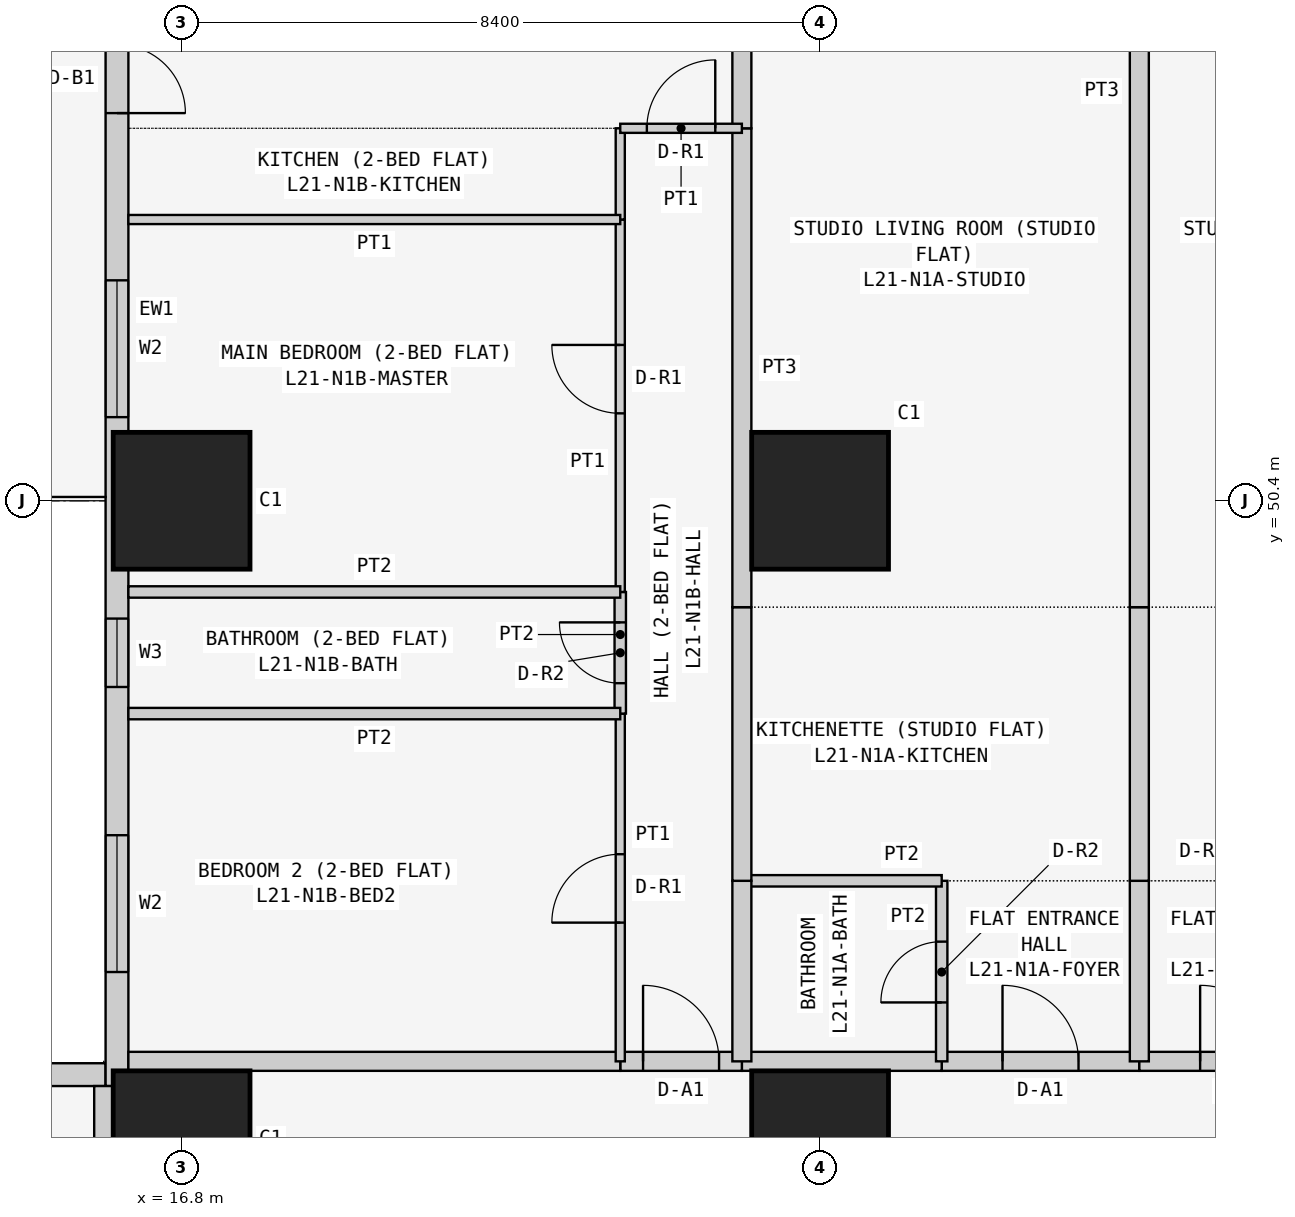
"""IFC4 building model, lengths in metres.
Left out: names, types, materials, properties, quantities, classifications, styles, units other than length and angle.
Written with IfcOpenShell. Run it as: python <this file> out.ifc"""

import sys

from ifc_helpers import new_model, si_unit, direction, frame, frame_2d, origin, origin_2d, place, context, subcontext, project, spatial, rectangle, extrude, element, fill, save


model = new_model("IFC4")
c1 = context("Model", 3, precision=1e-05, world=origin(), true_north=direction((0.0, 1.0)))
c2 = subcontext(c1, "Body", "Model", "MODEL_VIEW")
j1 = project(units=[si_unit("LENGTHUNIT", "METRE"), si_unit("PLANEANGLEUNIT", "RADIAN")], contexts=[c1])
p1 = place(None, origin())
s1 = spatial("IfcSite", under=j1, at=p1, CompositionType="ELEMENT")
p2 = place(p1, origin())
s2 = spatial("IfcBuilding", under=s1, at=p2, CompositionType="ELEMENT")
p3 = place(p2, frame((0.0, 0.0, 84.9)))
s3 = spatial("IfcBuildingStorey", under=s2, at=p3, CompositionType="ELEMENT", Elevation=84.9)
for number, where, z_axis, x_axis in (
    (1, (16.8, 42.0, 0.0), (0.0, 0.0, 1.0), (1.0, 0.0, 0.0)),
    (2, (16.8, 50.4, 0.0), (0.0, 0.0, 1.0), (1.0, 0.0, 0.0)),
    (3, (25.2, 42.0, 0.0), (0.0, 0.0, 1.0), (1.0, 0.0, 0.0)),
    (4, (25.2, 50.4, 0.0), (0.0, 0.0, 1.0), (1.0, 0.0, 0.0)),
):
    element("IfcColumn", number, at=place(p3, frame(where, z_axis=z_axis, x_axis=x_axis)), inside=s3, PredefinedType="COLUMN", context=c2, shape_type="SweptSolid", body=[
        extrude(rectangle(XDim=1.8, YDim=1.8, at=origin_2d()), origin(), (0.0, 0.0, 1.0), 3.6),
    ])
p4 = place(p3, frame((15.8, 42.85, 0.0), z_axis=(0.0, 0.0, 1.0), x_axis=(-1.0, 0.0, 0.0)))
e5 = element("IfcWall", 5, at=p4, inside=s3, PredefinedType="SOLIDWALL", context=c2, shape_type="SweptSolid", body=[
    extrude(rectangle(XDim=15.4, YDim=0.3, at=frame_2d((7.7, 0.0))), origin(), (0.0, 0.0, 1.0), 3.45),
])
p5 = place(p4, frame((1.2, 0.0, 0.9)))
e6 = element("IfcOpeningElement", 6, at=p5, cuts=e5, PredefinedType="OPENING", context=c2, shape_type="SweptSolid", body=[
    extrude(rectangle(XDim=1.8, YDim=1.5, at=frame_2d((0.9, 0.75))), frame((0.0, 0.16, 0.0), z_axis=(0.0, -1.0, 0.0), x_axis=(1.0, 0.0, 0.0)), (0.0, 0.0, 1.0), 0.32),
])
p6 = place(p4, frame((4.95, 0.0, 1.5)))
e7 = element("IfcOpeningElement", 7, at=p6, cuts=e5, PredefinedType="OPENING", context=c2, shape_type="SweptSolid", body=[
    extrude(rectangle(XDim=0.9, YDim=0.7, at=frame_2d((0.45, 0.35))), frame((0.0, 0.16, 0.0), z_axis=(0.0, -1.0, 0.0), x_axis=(1.0, 0.0, 0.0)), (0.0, 0.0, 1.0), 0.32),
])
p7 = place(p4, frame((8.5, 0.0, 0.9)))
e8 = element("IfcOpeningElement", 8, at=p7, cuts=e5, PredefinedType="OPENING", context=c2, shape_type="SweptSolid", body=[
    extrude(rectangle(XDim=1.8, YDim=1.5, at=frame_2d((0.9, 0.75))), frame((0.0, 0.16, 0.0), z_axis=(0.0, -1.0, 0.0), x_axis=(1.0, 0.0, 0.0)), (0.0, 0.0, 1.0), 0.32),
])
p8 = place(p4, frame((12.5, 0.0, 0.0)))
e9 = element("IfcOpeningElement", 9, at=p8, cuts=e5, PredefinedType="OPENING", context=c2, shape_type="SweptSolid", body=[
    extrude(rectangle(XDim=0.9, YDim=2.4, at=frame_2d((0.45, 1.2))), frame((0.0, 0.16, 0.0), z_axis=(0.0, -1.0, 0.0), x_axis=(1.0, 0.0, 0.0)), (0.0, 0.0, 1.0), 0.32),
])
p9 = place(p4, frame((13.5, 0.0, 0.9)))
e10 = element("IfcOpeningElement", 10, at=p9, cuts=e5, PredefinedType="OPENING", context=c2, shape_type="SweptSolid", body=[
    extrude(rectangle(XDim=1.2, YDim=1.5, at=frame_2d((0.6, 0.75))), frame((0.0, 0.16, 0.0), z_axis=(0.0, -1.0, 0.0), x_axis=(1.0, 0.0, 0.0)), (0.0, 0.0, 1.0), 0.32),
])
p10 = place(p3, frame((15.95, 58.4, 0.0), z_axis=(0.0, 0.0, 1.0), x_axis=(0.0, -1.0, 0.0)))
e11 = element("IfcWall", 11, at=p10, inside=s3, PredefinedType="SOLIDWALL", context=c2, shape_type="SweptSolid", body=[
    extrude(rectangle(XDim=15.7, YDim=0.3, at=frame_2d((7.85, 0.0))), origin(), (0.0, 0.0, 1.0), 3.45),
])
p11 = place(p10, frame((12.4, 0.0, 0.9)))
e12 = element("IfcOpeningElement", 12, at=p11, cuts=e11, PredefinedType="OPENING", context=c2, shape_type="SweptSolid", body=[
    extrude(rectangle(XDim=1.8, YDim=1.5, at=frame_2d((0.9, 0.75))), frame((0.0, 0.16, 0.0), z_axis=(0.0, -1.0, 0.0), x_axis=(1.0, 0.0, 0.0)), (0.0, 0.0, 1.0), 0.32),
])
p12 = place(p10, frame((9.55, 0.0, 1.5)))
e13 = element("IfcOpeningElement", 13, at=p12, cuts=e11, PredefinedType="OPENING", context=c2, shape_type="SweptSolid", body=[
    extrude(rectangle(XDim=0.9, YDim=0.7, at=frame_2d((0.45, 0.35))), frame((0.0, 0.16, 0.0), z_axis=(0.0, -1.0, 0.0), x_axis=(1.0, 0.0, 0.0)), (0.0, 0.0, 1.0), 0.32),
])
p13 = place(p10, frame((5.1, 0.0, 0.9)))
e14 = element("IfcOpeningElement", 14, at=p13, cuts=e11, PredefinedType="OPENING", context=c2, shape_type="SweptSolid", body=[
    extrude(rectangle(XDim=1.8, YDim=1.5, at=frame_2d((0.9, 0.75))), frame((0.0, 0.16, 0.0), z_axis=(0.0, -1.0, 0.0), x_axis=(1.0, 0.0, 0.0)), (0.0, 0.0, 1.0), 0.32),
])
p14 = place(p10, frame((2.0, 0.0, 0.0)))
e15 = element("IfcOpeningElement", 15, at=p14, cuts=e11, PredefinedType="OPENING", context=c2, shape_type="SweptSolid", body=[
    extrude(rectangle(XDim=0.9, YDim=2.4, at=frame_2d((0.45, 1.2))), frame((0.0, 0.16, 0.0), z_axis=(0.0, -1.0, 0.0), x_axis=(1.0, 0.0, 0.0)), (0.0, 0.0, 1.0), 0.32),
])
p15 = place(p10, frame((0.7, 0.0, 0.9)))
e16 = element("IfcOpeningElement", 16, at=p15, cuts=e11, PredefinedType="OPENING", context=c2, shape_type="SweptSolid", body=[
    extrude(rectangle(XDim=1.2, YDim=1.5, at=frame_2d((0.6, 0.75))), frame((0.0, 0.16, 0.0), z_axis=(0.0, -1.0, 0.0), x_axis=(1.0, 0.0, 0.0)), (0.0, 0.0, 1.0), 0.32),
])
p16 = place(p3, frame((26.8, 43.025, 0.0), z_axis=(0.0, 0.0, 1.0), x_axis=(1.0, 0.0, 0.0)))
e17 = element("IfcWall", 17, at=p16, inside=s3, PredefinedType="PARTITIONING", context=c2, shape_type="SweptSolid", body=[
    extrude(rectangle(XDim=2.6, YDim=0.25, at=frame_2d((1.3, 0.0))), origin(), (0.0, 0.0, 1.0), 3.45),
])
p17 = place(p16, frame((0.8, 0.0, 0.0)))
e18 = element("IfcOpeningElement", 18, at=p17, cuts=e17, PredefinedType="OPENING", context=c2, shape_type="SweptSolid", body=[
    extrude(rectangle(XDim=1.0, YDim=2.1, at=frame_2d((0.5, 1.05))), frame((0.0, 0.135, 0.0), z_axis=(0.0, -1.0, 0.0), x_axis=(1.0, 0.0, 0.0)), (0.0, 0.0, 1.0), 0.27),
])
p18 = place(p3, frame((24.171, 43.025, 0.0), z_axis=(0.0, 0.0, 1.0), x_axis=(1.0, 0.0, 0.0)))
e19 = element("IfcWall", 19, at=p18, inside=s3, PredefinedType="PARTITIONING", context=c2, shape_type="SweptSolid", body=[
    extrude(rectangle(XDim=2.629, YDim=0.25, at=frame_2d((1.314, 0.0))), origin(), (0.0, 0.0, 1.0), 3.45),
])
p19 = place(p3, frame((22.571, 43.025, 0.0), z_axis=(0.0, 0.0, 1.0), x_axis=(1.0, 0.0, 0.0)))
e20 = element("IfcWall", 20, at=p19, inside=s3, PredefinedType="PARTITIONING", context=c2, shape_type="SweptSolid", body=[
    extrude(rectangle(XDim=1.6, YDim=0.25, at=frame_2d((0.8, 0.0))), origin(), (0.0, 0.0, 1.0), 3.45),
])
p20 = place(p19, frame((0.3, 0.0, 0.0)))
e21 = element("IfcOpeningElement", 21, at=p20, cuts=e20, PredefinedType="OPENING", context=c2, shape_type="SweptSolid", body=[
    extrude(rectangle(XDim=1.0, YDim=2.1, at=frame_2d((0.5, 1.05))), frame((0.0, 0.135, 0.0), z_axis=(0.0, -1.0, 0.0), x_axis=(1.0, 0.0, 0.0)), (0.0, 0.0, 1.0), 0.27),
])
p21 = place(p3, frame((16.1, 43.025, 0.0), z_axis=(0.0, 0.0, 1.0), x_axis=(1.0, 0.0, 0.0)))
e22 = element("IfcWall", 22, at=p21, inside=s3, PredefinedType="PARTITIONING", context=c2, shape_type="SweptSolid", body=[
    extrude(rectangle(XDim=6.471, YDim=0.25, at=frame_2d((3.235, 0.0))), origin(), (0.0, 0.0, 1.0), 3.45),
])
p22 = place(p3, frame((29.4, 43.025, 0.0), z_axis=(0.0, 0.0, 1.0), x_axis=(1.0, 0.0, 0.0)))
e23 = element("IfcWall", 23, at=p22, inside=s3, PredefinedType="PARTITIONING", context=c2, shape_type="SweptSolid", body=[
    extrude(rectangle(XDim=2.6, YDim=0.25, at=frame_2d((1.3, 0.0))), origin(), (0.0, 0.0, 1.0), 3.45),
])
p23 = place(p22, frame((0.8, 0.0, 0.0)))
e24 = element("IfcOpeningElement", 24, at=p23, cuts=e23, PredefinedType="OPENING", context=c2, shape_type="SweptSolid", body=[
    extrude(rectangle(XDim=1.0, YDim=2.1, at=frame_2d((0.5, 1.05))), frame((0.0, 0.135, 0.0), z_axis=(0.0, -1.0, 0.0), x_axis=(1.0, 0.0, 0.0)), (0.0, 0.0, 1.0), 0.27),
])
p24 = place(p3, frame((15.775, 36.229, 0.0), z_axis=(0.0, 0.0, 1.0), x_axis=(0.0, 1.0, 0.0)))
e25 = element("IfcWall", 25, at=p24, inside=s3, PredefinedType="PARTITIONING", context=c2, shape_type="SweptSolid", body=[
    extrude(rectangle(XDim=6.471, YDim=0.25, at=frame_2d((3.235, 0.0))), origin(), (0.0, 0.0, 1.0), 3.45),
])
p25 = place(p3, frame((26.8, 45.4, 0.0), z_axis=(0.0, 0.0, 1.0), x_axis=(0.0, -1.0, 0.0)))
e26 = element("IfcWall", 26, at=p25, inside=s3, PredefinedType="PARTITIONING", context=c2, shape_type="SweptSolid", body=[
    extrude(rectangle(XDim=2.375, YDim=0.15, at=frame_2d((1.188, 0.0))), origin(), (0.0, 0.0, 1.0), 3.45),
])
p26 = place(p25, frame((0.8, 0.0, 0.0)))
e27 = element("IfcOpeningElement", 27, at=p26, cuts=e26, PredefinedType="OPENING", context=c2, shape_type="SweptSolid", body=[
    extrude(rectangle(XDim=0.8, YDim=2.1, at=frame_2d((0.4, 1.05))), frame((0.0, 0.085, 0.0), z_axis=(0.0, -1.0, 0.0), x_axis=(1.0, 0.0, 0.0)), (0.0, 0.0, 1.0), 0.17),
])
p27 = place(p3, frame((29.4, 43.025, 0.0), z_axis=(0.0, 0.0, 1.0), x_axis=(0.0, 1.0, 0.0)))
e28 = element("IfcWall", 28, at=p27, inside=s3, PredefinedType="PARTITIONING", context=c2, shape_type="SweptSolid", body=[
    extrude(rectangle(XDim=2.375, YDim=0.25, at=frame_2d((1.188, 0.0))), origin(), (0.0, 0.0, 1.0), 2.848),
])
p28 = place(p3, frame((26.8, 45.4, 0.0), z_axis=(0.0, 0.0, 1.0), x_axis=(-1.0, 0.0, 0.0)))
e29 = element("IfcWall", 29, at=p28, inside=s3, PredefinedType="PARTITIONING", context=c2, shape_type="SweptSolid", body=[
    extrude(rectangle(XDim=2.629, YDim=0.15, at=frame_2d((1.314, 0.0))), origin(), (0.0, 0.0, 1.0), 3.45),
])
p29 = place(p3, frame((24.171, 45.4, 0.0), z_axis=(0.0, 0.0, 1.0), x_axis=(0.0, -1.0, 0.0)))
e30 = element("IfcWall", 30, at=p29, inside=s3, PredefinedType="PARTITIONING", context=c2, shape_type="SweptSolid", body=[
    extrude(rectangle(XDim=2.375, YDim=0.25, at=frame_2d((1.188, 0.0))), origin(), (0.0, 0.0, 1.0), 3.45),
])
p30 = place(p3, frame((24.171, 49.0, 0.0), z_axis=(0.0, 0.0, 1.0), x_axis=(0.0, -1.0, 0.0)))
e31 = element("IfcWall", 31, at=p30, inside=s3, PredefinedType="PARTITIONING", context=c2, shape_type="SweptSolid", body=[
    extrude(rectangle(XDim=3.6, YDim=0.25, at=frame_2d((1.8, 0.0))), origin(), (0.0, 0.0, 1.0), 3.45),
])
p31 = place(p3, frame((29.4, 45.4, 0.0), z_axis=(0.0, 0.0, 1.0), x_axis=(0.0, 1.0, 0.0)))
e32 = element("IfcWall", 32, at=p31, inside=s3, PredefinedType="PARTITIONING", context=c2, shape_type="SweptSolid", body=[
    extrude(rectangle(XDim=3.6, YDim=0.25, at=frame_2d((1.8, 0.0))), origin(), (0.0, 0.0, 1.0), 2.848),
])
p32 = place(p3, frame((24.171, 55.3, 0.0), z_axis=(0.0, 0.0, 1.0), x_axis=(0.0, -1.0, 0.0)))
e33 = element("IfcWall", 33, at=p32, inside=s3, PredefinedType="PARTITIONING", context=c2, shape_type="SweptSolid", body=[
    extrude(rectangle(XDim=6.3, YDim=0.25, at=frame_2d((3.15, 0.0))), origin(), (0.0, 0.0, 1.0), 3.45),
])
p33 = place(p3, frame((24.171, 59.45, 0.0), z_axis=(0.0, 0.0, 1.0), x_axis=(0.0, -1.0, 0.0)))
e34 = element("IfcWall", 34, at=p33, inside=s3, PredefinedType="PARTITIONING", context=c2, shape_type="SweptSolid", body=[
    extrude(rectangle(XDim=4.15, YDim=0.25, at=frame_2d((2.075, 0.0))), origin(), (0.0, 0.0, 1.0), 3.45),
])
p34 = place(p3, frame((29.4, 49.0, 0.0), z_axis=(0.0, 0.0, 1.0), x_axis=(0.0, 1.0, 0.0)))
e35 = element("IfcWall", 35, at=p34, inside=s3, PredefinedType="PARTITIONING", context=c2, shape_type="SweptSolid", body=[
    extrude(rectangle(XDim=10.45, YDim=0.25, at=frame_2d((5.225, 0.0))), origin(), (0.0, 0.0, 1.0), 2.848),
])
p35 = place(p3, frame((22.571, 47.6, 0.0), z_axis=(0.0, 0.0, 1.0), x_axis=(0.0, -1.0, 0.0)))
e36 = element("IfcWall", 36, at=p35, inside=s3, PredefinedType="PARTITIONING", context=c2, shape_type="SweptSolid", body=[
    extrude(rectangle(XDim=4.575, YDim=0.12, at=frame_2d((2.288, 0.0))), origin(), (0.0, 0.0, 1.0), 3.45),
])
p36 = place(p35, frame((1.85, 0.0, 0.0)))
e37 = element("IfcOpeningElement", 37, at=p36, cuts=e36, PredefinedType="OPENING", context=c2, shape_type="SweptSolid", body=[
    extrude(rectangle(XDim=0.9, YDim=2.1, at=frame_2d((0.45, 1.05))), frame((0.0, 0.07, 0.0), z_axis=(0.0, -1.0, 0.0), x_axis=(1.0, 0.0, 0.0)), (0.0, 0.0, 1.0), 0.14),
])
p37 = place(p3, frame((22.571, 49.2, 0.0), z_axis=(0.0, 0.0, 1.0), x_axis=(0.0, -1.0, 0.0)))
e38 = element("IfcWall", 38, at=p37, inside=s3, PredefinedType="PARTITIONING", context=c2, shape_type="SweptSolid", body=[
    extrude(rectangle(XDim=1.6, YDim=0.15, at=frame_2d((0.8, 0.0))), origin(), (0.0, 0.0, 1.0), 3.45),
])
p38 = place(p37, frame((0.4, 0.0, 0.0)))
e39 = element("IfcOpeningElement", 39, at=p38, cuts=e38, PredefinedType="OPENING", context=c2, shape_type="SweptSolid", body=[
    extrude(rectangle(XDim=0.8, YDim=2.1, at=frame_2d((0.4, 1.05))), frame((0.0, 0.085, 0.0), z_axis=(0.0, -1.0, 0.0), x_axis=(1.0, 0.0, 0.0)), (0.0, 0.0, 1.0), 0.17),
])
p39 = place(p3, frame((22.571, 54.1, 0.0), z_axis=(0.0, 0.0, 1.0), x_axis=(0.0, -1.0, 0.0)))
e40 = element("IfcWall", 40, at=p39, inside=s3, PredefinedType="PARTITIONING", context=c2, shape_type="SweptSolid", body=[
    extrude(rectangle(XDim=4.9, YDim=0.12, at=frame_2d((2.45, 0.0))), origin(), (0.0, 0.0, 1.0), 3.45),
])
p40 = place(p39, frame((1.65, 0.0, 0.0)))
e41 = element("IfcOpeningElement", 41, at=p40, cuts=e40, PredefinedType="OPENING", context=c2, shape_type="SweptSolid", body=[
    extrude(rectangle(XDim=0.9, YDim=2.1, at=frame_2d((0.45, 1.05))), frame((0.0, 0.07, 0.0), z_axis=(0.0, -1.0, 0.0), x_axis=(1.0, 0.0, 0.0)), (0.0, 0.0, 1.0), 0.14),
])
p41 = place(p3, frame((22.571, 55.3, 0.0), z_axis=(0.0, 0.0, 1.0), x_axis=(0.0, -1.0, 0.0)))
e42 = element("IfcWall", 42, at=p41, inside=s3, PredefinedType="PARTITIONING", context=c2, shape_type="SweptSolid", body=[
    extrude(rectangle(XDim=1.2, YDim=0.12, at=frame_2d((0.6, 0.0))), origin(), (0.0, 0.0, 1.0), 3.45),
])
p42 = place(p3, frame((24.171, 55.3, 0.0), z_axis=(0.0, 0.0, 1.0), x_axis=(-1.0, 0.0, 0.0)))
e43 = element("IfcWall", 43, at=p42, inside=s3, PredefinedType="PARTITIONING", context=c2, shape_type="SweptSolid", body=[
    extrude(rectangle(XDim=1.6, YDim=0.12, at=frame_2d((0.8, 0.0))), origin(), (0.0, 0.0, 1.0), 3.45),
])
p43 = place(p42, frame((0.35, 0.0, 0.0)))
e44 = element("IfcOpeningElement", 44, at=p43, cuts=e43, PredefinedType="OPENING", context=c2, shape_type="SweptSolid", body=[
    extrude(rectangle(XDim=0.9, YDim=2.1, at=frame_2d((0.45, 1.05))), frame((0.0, 0.07, 0.0), z_axis=(0.0, -1.0, 0.0), x_axis=(1.0, 0.0, 0.0)), (0.0, 0.0, 1.0), 0.14),
])
for number, where, z_axis, x_axis in (
    (45, (22.571, 47.6, 0.0), (0.0, 0.0, 1.0), (-1.0, 0.0, 0.0)),
    (46, (22.571, 49.2, 0.0), (0.0, 0.0, 1.0), (-1.0, 0.0, 0.0)),
):
    element("IfcWall", number, at=place(p3, frame(where, z_axis=z_axis, x_axis=x_axis)), inside=s3, PredefinedType="PARTITIONING", context=c2, shape_type="SweptSolid", body=[
        extrude(rectangle(XDim=6.471, YDim=0.15, at=frame_2d((3.235, 0.0))), origin(), (0.0, 0.0, 1.0), 3.45),
    ])
p44 = place(p3, frame((22.571, 54.1, 0.0), z_axis=(0.0, 0.0, 1.0), x_axis=(-1.0, 0.0, 0.0)))
e47 = element("IfcWall", 47, at=p44, inside=s3, PredefinedType="PARTITIONING", context=c2, shape_type="SweptSolid", body=[
    extrude(rectangle(XDim=6.471, YDim=0.12, at=frame_2d((3.235, 0.0))), origin(), (0.0, 0.0, 1.0), 3.45),
])
p45 = place(p11, origin())
e48 = element("IfcWindow", 48, at=p45, inside=s3, PartitioningType="SINGLE_PANEL", PredefinedType="WINDOW", context=c2, shape_type="SweptSolid", body=[
    extrude(rectangle(XDim=1.8, YDim=1.5, at=frame_2d((0.9, 0.75))), frame((0.0, 0.03, 0.0), z_axis=(0.0, -1.0, 0.0), x_axis=(1.0, 0.0, 0.0)), (0.0, 0.0, 1.0), 0.06),
])
fill(e12, e48)
p46 = place(p12, origin())
e49 = element("IfcWindow", 49, at=p46, inside=s3, PartitioningType="SINGLE_PANEL", PredefinedType="WINDOW", context=c2, shape_type="SweptSolid", body=[
    extrude(rectangle(XDim=0.9, YDim=0.7, at=frame_2d((0.45, 0.35))), frame((0.0, 0.03, 0.0), z_axis=(0.0, -1.0, 0.0), x_axis=(1.0, 0.0, 0.0)), (0.0, 0.0, 1.0), 0.06),
])
fill(e13, e49)
p47 = place(p13, origin())
e50 = element("IfcWindow", 50, at=p47, inside=s3, PartitioningType="SINGLE_PANEL", PredefinedType="WINDOW", context=c2, shape_type="SweptSolid", body=[
    extrude(rectangle(XDim=1.8, YDim=1.5, at=frame_2d((0.9, 0.75))), frame((0.0, 0.03, 0.0), z_axis=(0.0, -1.0, 0.0), x_axis=(1.0, 0.0, 0.0)), (0.0, 0.0, 1.0), 0.06),
])
fill(e14, e50)
p48 = place(p14, origin())
e51 = element("IfcDoor", 51, at=p48, inside=s3, OperationType="SINGLE_SWING_RIGHT", PredefinedType="DOOR", context=c2, shape_type="SweptSolid", body=[
    extrude(rectangle(XDim=0.9, YDim=2.4, at=frame_2d((0.45, 1.2))), frame((0.0, 0.025, 0.0), z_axis=(0.0, -1.0, 0.0), x_axis=(1.0, 0.0, 0.0)), (0.0, 0.0, 1.0), 0.05),
])
fill(e15, e51)
p49 = place(p17, origin())
e52 = element("IfcDoor", 52, at=p49, inside=s3, OperationType="SINGLE_SWING_LEFT", PredefinedType="DOOR", context=c2, shape_type="SweptSolid", body=[
    extrude(rectangle(XDim=1.0, YDim=2.1, at=frame_2d((0.5, 1.05))), frame((0.0, 0.025, 0.0), z_axis=(0.0, -1.0, 0.0), x_axis=(1.0, 0.0, 0.0)), (0.0, 0.0, 1.0), 0.05),
])
fill(e18, e52)
p50 = place(p26, frame((0.8, 0.0, 0.0), z_axis=(0.0, 0.0, 1.0), x_axis=(-1.0, 0.0, 0.0)))
e53 = element("IfcDoor", 53, at=p50, inside=s3, OperationType="SINGLE_SWING_LEFT", PredefinedType="DOOR", context=c2, shape_type="SweptSolid", body=[
    extrude(rectangle(XDim=0.8, YDim=2.1, at=frame_2d((0.4, 1.05))), frame((0.0, 0.025, 0.0), z_axis=(0.0, -1.0, 0.0), x_axis=(1.0, 0.0, 0.0)), (0.0, 0.0, 1.0), 0.05),
])
fill(e27, e53)
p51 = place(p20, origin())
e54 = element("IfcDoor", 54, at=p51, inside=s3, OperationType="SINGLE_SWING_LEFT", PredefinedType="DOOR", context=c2, shape_type="SweptSolid", body=[
    extrude(rectangle(XDim=1.0, YDim=2.1, at=frame_2d((0.5, 1.05))), frame((0.0, 0.025, 0.0), z_axis=(0.0, -1.0, 0.0), x_axis=(1.0, 0.0, 0.0)), (0.0, 0.0, 1.0), 0.05),
])
fill(e21, e54)
p52 = place(p36, frame((0.9, 0.0, 0.0), z_axis=(0.0, 0.0, 1.0), x_axis=(-1.0, 0.0, 0.0)))
e55 = element("IfcDoor", 55, at=p52, inside=s3, OperationType="SINGLE_SWING_LEFT", PredefinedType="DOOR", context=c2, shape_type="SweptSolid", body=[
    extrude(rectangle(XDim=0.9, YDim=2.1, at=frame_2d((0.45, 1.05))), frame((0.0, 0.025, 0.0), z_axis=(0.0, -1.0, 0.0), x_axis=(1.0, 0.0, 0.0)), (0.0, 0.0, 1.0), 0.05),
])
fill(e37, e55)
p53 = place(p38, frame((0.8, 0.0, 0.0), z_axis=(0.0, 0.0, 1.0), x_axis=(-1.0, 0.0, 0.0)))
e56 = element("IfcDoor", 56, at=p53, inside=s3, OperationType="SINGLE_SWING_RIGHT", PredefinedType="DOOR", context=c2, shape_type="SweptSolid", body=[
    extrude(rectangle(XDim=0.8, YDim=2.1, at=frame_2d((0.4, 1.05))), frame((0.0, 0.025, 0.0), z_axis=(0.0, -1.0, 0.0), x_axis=(1.0, 0.0, 0.0)), (0.0, 0.0, 1.0), 0.05),
])
fill(e39, e56)
p54 = place(p40, frame((0.9, 0.0, 0.0), z_axis=(0.0, 0.0, 1.0), x_axis=(-1.0, 0.0, 0.0)))
e57 = element("IfcDoor", 57, at=p54, inside=s3, OperationType="SINGLE_SWING_RIGHT", PredefinedType="DOOR", context=c2, shape_type="SweptSolid", body=[
    extrude(rectangle(XDim=0.9, YDim=2.1, at=frame_2d((0.45, 1.05))), frame((0.0, 0.025, 0.0), z_axis=(0.0, -1.0, 0.0), x_axis=(1.0, 0.0, 0.0)), (0.0, 0.0, 1.0), 0.05),
])
fill(e41, e57)
p55 = place(p43, frame((0.9, 0.0, 0.0), z_axis=(0.0, 0.0, 1.0), x_axis=(-1.0, 0.0, 0.0)))
e58 = element("IfcDoor", 58, at=p55, inside=s3, OperationType="SINGLE_SWING_RIGHT", PredefinedType="DOOR", context=c2, shape_type="SweptSolid", body=[
    extrude(rectangle(XDim=0.9, YDim=2.1, at=frame_2d((0.45, 1.05))), frame((0.0, 0.025, 0.0), z_axis=(0.0, -1.0, 0.0), x_axis=(1.0, 0.0, 0.0)), (0.0, 0.0, 1.0), 0.05),
])
fill(e44, e58)
p56 = place(p23, origin())
e59 = element("IfcDoor", 59, at=p56, inside=s3, OperationType="SINGLE_SWING_LEFT", PredefinedType="DOOR", context=c2, shape_type="SweptSolid", body=[
    extrude(rectangle(XDim=1.0, YDim=2.1, at=frame_2d((0.5, 1.05))), frame((0.0, 0.025, 0.0), z_axis=(0.0, -1.0, 0.0), x_axis=(1.0, 0.0, 0.0)), (0.0, 0.0, 1.0), 0.05),
])
fill(e24, e59)
save(model, sys.argv[1])
